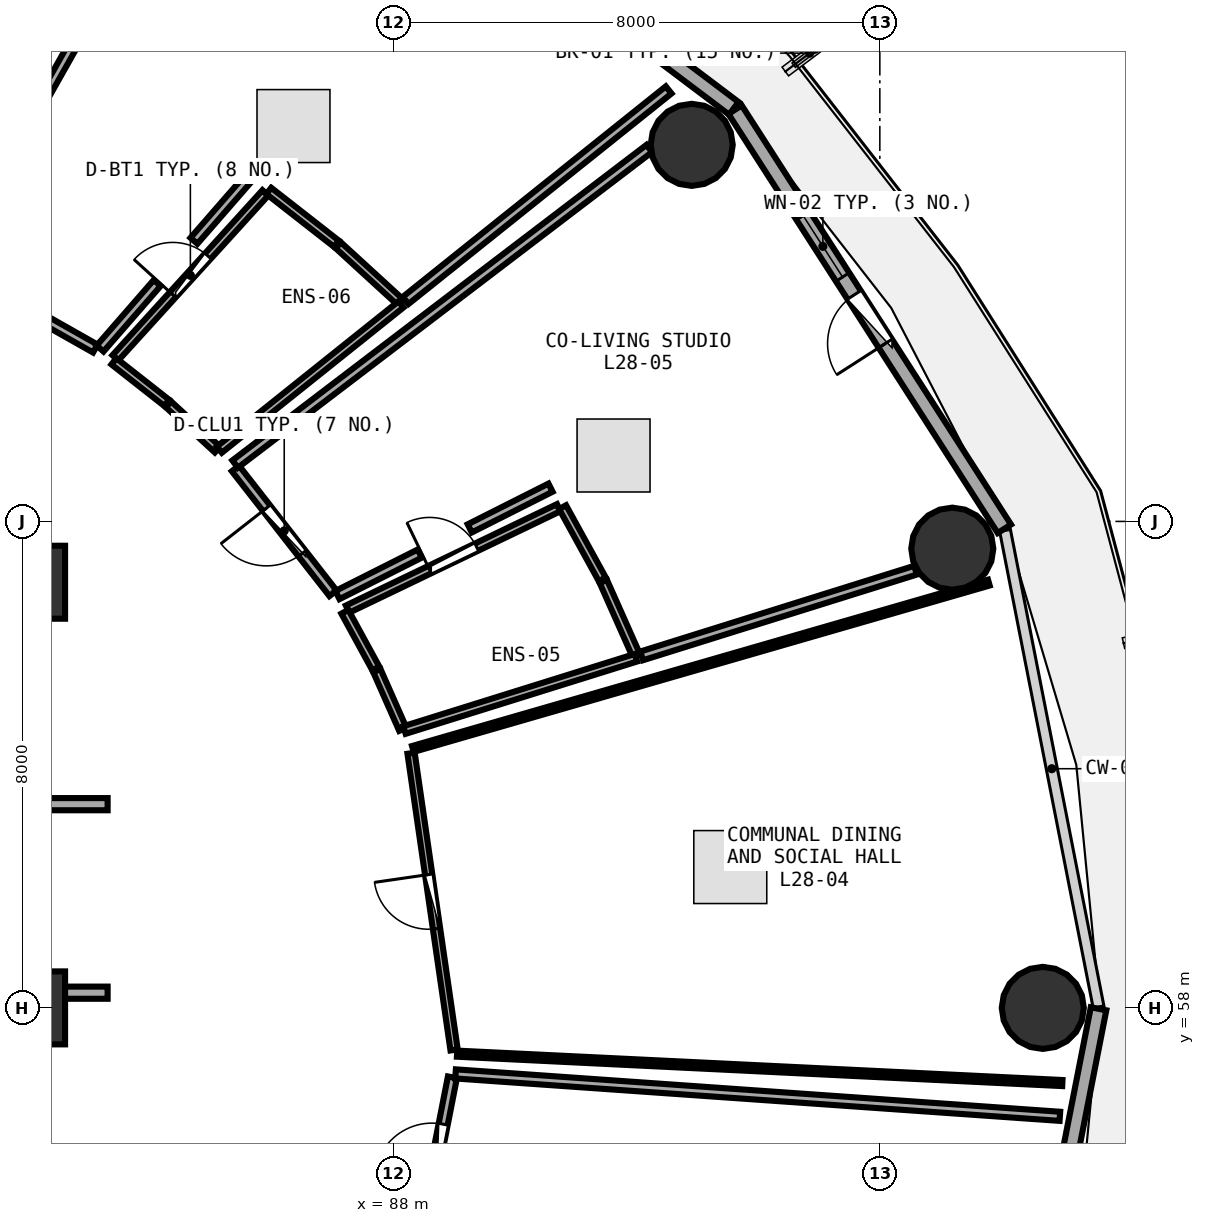
"""IFC4 building model, lengths in metres.
Left out: names, types, materials, properties, quantities, classifications, styles, units other than length and angle.
Written with IfcOpenShell. Run it as: python <this file> out.ifc"""

import sys

from ifc_helpers import new_model, si_unit, direction, frame, frame_2d, origin, origin_2d, place, context, subcontext, project, spatial, rectangle, circle, extrude, element, fill, save


model = new_model("IFC4")
c1 = context("Model", 3, precision=1e-05, world=origin(), true_north=direction((0.0, 1.0)))
c2 = subcontext(c1, "Body", "Model", "MODEL_VIEW")
j1 = project(units=[si_unit("LENGTHUNIT", "METRE"), si_unit("PLANEANGLEUNIT", "RADIAN")], contexts=[c1])
p1 = place(None, origin())
s1 = spatial("IfcSite", under=j1, at=p1, CompositionType="ELEMENT")
p2 = place(p1, origin())
s2 = spatial("IfcBuilding", under=s1, at=p2, CompositionType="ELEMENT")
p3 = place(p2, frame((0.0, 0.0, 110.1)))
s3 = spatial("IfcBuildingStorey", under=s2, at=p3, CompositionType="ELEMENT", Elevation=110.1)
for number, where, z_axis, x_axis in (
    (1, (82.0, 58.0, 0.0), (0.0, 0.0, 1.0), (1.0, 0.0, 0.0)),
    (2, (82.0, 65.0, 0.0), (0.0, 0.0, 1.0), (1.0, 0.0, 0.0)),
):
    element("IfcColumn", number, at=place(p3, frame(where, z_axis=z_axis, x_axis=x_axis)), inside=s3, PredefinedType="PILASTER", context=c2, shape_type="SweptSolid", body=[
        extrude(rectangle(XDim=1.2, YDim=1.2, at=origin_2d()), origin(), (0.0, 0.0, 1.0), 3.75),
    ])
for number, where, z_axis, x_axis in (
    (3, (98.68, 58.0, 0.0), (0.0, 0.0, 1.0), (1.0, 0.0, 0.0)),
    (4, (97.192, 65.552, 0.0), (0.0, 0.0, 1.0), (1.0, 0.0, 0.0)),
    (5, (92.906, 72.193, 0.0), (0.0, 0.0, 1.0), (1.0, 0.0, 0.0)),
):
    element("IfcColumn", number, at=place(p3, frame(where, z_axis=z_axis, x_axis=x_axis)), inside=s3, PredefinedType="COLUMN", context=c2, shape_type="SweptSolid", body=[
        extrude(circle(Radius=0.675, at=origin_2d()), origin(), (0.0, 0.0, 1.0), 3.75),
    ])
p4 = place(p3, frame((98.048, 65.879, 0.0), z_axis=(0.0, 0.0, 1.0), x_axis=(-0.540620528459, 0.841266571432, 0.0)))
e6 = element("IfcWall", 6, at=p4, inside=s3, PredefinedType="SOLIDWALL", context=c2, shape_type="SweptSolid", body=[
    extrude(rectangle(XDim=8.193, YDim=0.26, at=frame_2d((4.096, 0.0))), origin(), (0.0, 0.0, 1.0), 3.475),
])
p5 = place(p4, frame((3.621, 0.0, 0.0)))
e7 = element("IfcOpeningElement", 7, at=p5, cuts=e6, PredefinedType="OPENING", context=c2, shape_type="SweptSolid", body=[
    extrude(rectangle(XDim=0.95, YDim=2.1, at=frame_2d((0.475, 1.05))), frame((0.0, 0.14, 0.0), z_axis=(0.0, -1.0, 0.0), x_axis=(1.0, 0.0, 0.0)), (0.0, 0.0, 1.0), 0.28),
])
p6 = place(p4, frame((4.921, 0.0, 0.85)))
e8 = element("IfcOpeningElement", 8, at=p6, cuts=e6, PredefinedType="OPENING", context=c2, shape_type="SweptSolid", body=[
    extrude(rectangle(XDim=1.2, YDim=1.45, at=frame_2d((0.6, 0.725))), frame((0.0, 0.14, 0.0), z_axis=(0.0, -1.0, 0.0), x_axis=(1.0, 0.0, 0.0)), (0.0, 0.0, 1.0), 0.28),
])
p7 = place(p3, frame((93.599, 72.793, 0.0), z_axis=(0.0, 0.0, 1.0), x_axis=(-0.798501507879, 0.601992808857, 0.0)))
e9 = element("IfcWall", 9, at=p7, inside=s3, PredefinedType="SOLIDWALL", context=c2, shape_type="SweptSolid", body=[
    extrude(rectangle(XDim=8.499, YDim=0.26, at=frame_2d((4.25, 0.0))), origin(), (0.0, 0.0, 1.0), 3.475),
])
p8 = place(p7, frame((3.775, 0.0, 0.0)))
e10 = element("IfcOpeningElement", 10, at=p8, cuts=e9, PredefinedType="OPENING", context=c2, shape_type="SweptSolid", body=[
    extrude(rectangle(XDim=0.95, YDim=2.1, at=frame_2d((0.475, 1.05))), frame((0.0, 0.14, 0.0), z_axis=(0.0, -1.0, 0.0), x_axis=(1.0, 0.0, 0.0)), (0.0, 0.0, 1.0), 0.28),
])
p9 = place(p7, frame((5.075, 0.0, 0.85)))
e11 = element("IfcOpeningElement", 11, at=p9, cuts=e9, PredefinedType="OPENING", context=c2, shape_type="SweptSolid", body=[
    extrude(rectangle(XDim=1.2, YDim=1.45, at=frame_2d((0.6, 0.725))), frame((0.0, 0.14, 0.0), z_axis=(0.0, -1.0, 0.0), x_axis=(1.0, 0.0, 0.0)), (0.0, 0.0, 1.0), 0.28),
])
p10 = place(p3, frame((98.059, 50.148, 0.0), z_axis=(0.0, 0.0, 1.0), x_axis=(0.192581843632, 0.981280914674, 0.0)))
e12 = element("IfcWall", 12, at=p10, inside=s3, PredefinedType="SOLIDWALL", context=c2, shape_type="SweptSolid", body=[
    extrude(rectangle(XDim=7.987, YDim=0.26, at=frame_2d((3.993, 0.0))), origin(), (0.0, 0.0, 1.0), 3.475),
])
p11 = place(p10, frame((3.193, 0.0, 0.85)))
e13 = element("IfcOpeningElement", 13, at=p11, cuts=e12, PredefinedType="OPENING", context=c2, shape_type="SweptSolid", body=[
    extrude(rectangle(XDim=1.6, YDim=1.45, at=frame_2d((0.8, 0.725))), frame((0.0, 0.14, 0.0), z_axis=(0.0, -1.0, 0.0), x_axis=(1.0, 0.0, 0.0)), (0.0, 0.0, 1.0), 0.28),
])
p12 = place(p3, frame((79.3, 61.35, 0.0), z_axis=(0.0, 0.0, 1.0), x_axis=(1.0, 0.0, 0.0)))
e14 = element("IfcWall", 14, at=p12, inside=s3, PredefinedType="SOLIDWALL", context=c2, shape_type="SweptSolid", body=[
    extrude(rectangle(XDim=4.0, YDim=0.2, at=frame_2d((2.0, 0.0))), origin(), (0.0, 0.0, 1.0), 2.775),
])
p13 = place(p12, frame((0.45, 0.0, 0.0)))
e15 = element("IfcOpeningElement", 15, at=p13, cuts=e14, PredefinedType="OPENING", context=c2, shape_type="SweptSolid", body=[
    extrude(rectangle(XDim=1.2, YDim=2.15, at=frame_2d((0.6, 1.075))), frame((0.0, 0.11, 0.0), z_axis=(0.0, -1.0, 0.0), x_axis=(1.0, 0.0, 0.0)), (0.0, 0.0, 1.0), 0.22),
])
p14 = place(p3, frame((79.3, 58.25, 0.0), z_axis=(0.0, 0.0, 1.0), x_axis=(1.0, 0.0, 0.0)))
e16 = element("IfcWall", 16, at=p14, inside=s3, PredefinedType="SOLIDWALL", context=c2, shape_type="SweptSolid", body=[
    extrude(rectangle(XDim=4.0, YDim=0.2, at=frame_2d((2.0, 0.0))), origin(), (0.0, 0.0, 1.0), 2.775),
])
p15 = place(p14, frame((0.5, 0.0, 0.0)))
e17 = element("IfcOpeningElement", 17, at=p15, cuts=e16, PredefinedType="OPENING", context=c2, shape_type="SweptSolid", body=[
    extrude(rectangle(XDim=1.1, YDim=2.1, at=frame_2d((0.55, 1.05))), frame((0.0, 0.11, 0.0), z_axis=(0.0, -1.0, 0.0), x_axis=(1.0, 0.0, 0.0)), (0.0, 0.0, 1.0), 0.22),
])
p16 = place(p3, frame((88.485, 54.384, 0.0), z_axis=(0.0, 0.0, 1.0), x_axis=(0.192670392626, 0.981263532292, 0.0)))
e18 = element("IfcWall", 18, at=p16, inside=s3, PredefinedType="PARTITIONING", context=c2, shape_type="SweptSolid", body=[
    extrude(rectangle(XDim=2.522, YDim=0.15, at=frame_2d((1.261, 0.0))), origin(), (0.0, 0.0, 1.0), 3.48),
])
p17 = place(p16, frame((0.786, 0.0, 0.0)))
e19 = element("IfcOpeningElement", 19, at=p17, cuts=e18, PredefinedType="OPENING", context=c2, shape_type="SweptSolid", body=[
    extrude(rectangle(XDim=0.95, YDim=2.08, at=frame_2d((0.475, 1.04))), frame((0.0, 0.085, 0.0), z_axis=(0.0, -1.0, 0.0), x_axis=(1.0, 0.0, 0.0)), (0.0, 0.0, 1.0), 0.17),
])
p18 = place(p3, frame((88.998, 57.308, 0.0), z_axis=(0.0, 0.0, 1.0), x_axis=(-0.143556297193, 0.989642152263, 0.0)))
e20 = element("IfcWall", 20, at=p18, inside=s3, PredefinedType="PARTITIONING", context=c2, shape_type="SweptSolid", body=[
    extrude(rectangle(XDim=4.93, YDim=0.12, at=frame_2d((2.465, 0.0))), origin(), (0.0, 0.0, 1.0), 2.925),
])
p19 = place(p18, frame((2.015, 0.0, 0.0)))
e21 = element("IfcOpeningElement", 21, at=p19, cuts=e20, PredefinedType="OPENING", context=c2, shape_type="SweptSolid", body=[
    extrude(rectangle(XDim=0.9, YDim=2.08, at=frame_2d((0.45, 1.04))), frame((0.0, 0.07, 0.0), z_axis=(0.0, -1.0, 0.0), x_axis=(1.0, 0.0, 0.0)), (0.0, 0.0, 1.0), 0.14),
])
p20 = place(p3, frame((87.246, 64.558, 0.0), z_axis=(0.0, 0.0, 1.0), x_axis=(0.901424148611, 0.432937067368, 0.0)))
e22 = element("IfcWall", 22, at=p20, inside=s3, PredefinedType="PLUMBINGWALL", context=c2, shape_type="SweptSolid", body=[
    extrude(rectangle(XDim=3.853, YDim=0.13, at=frame_2d((1.926, 0.0))), origin(), (0.0, 0.0, 1.0), 2.925),
])
p21 = place(p20, frame((1.496, 0.0, 0.0)))
e23 = element("IfcOpeningElement", 23, at=p21, cuts=e22, PredefinedType="OPENING", context=c2, shape_type="SweptSolid", body=[
    extrude(rectangle(XDim=0.86, YDim=2.05, at=frame_2d((0.43, 1.025))), frame((0.0, 0.075, 0.0), z_axis=(0.0, -1.0, 0.0), x_axis=(1.0, 0.0, 0.0)), (0.0, 0.0, 1.0), 0.15),
])
p22 = place(p3, frame((87.007, 64.818, 0.0), z_axis=(0.0, 0.0, 1.0), x_axis=(-0.615858536596, 0.78785675278, 0.0)))
e24 = element("IfcWall", 24, at=p22, inside=s3, PredefinedType="PARTITIONING", context=c2, shape_type="SweptSolid", body=[
    extrude(rectangle(XDim=2.606, YDim=0.15, at=frame_2d((1.303, 0.0))), origin(), (0.0, 0.0, 1.0), 2.925),
])
p23 = place(p22, frame((0.828, 0.0, 0.0)))
e25 = element("IfcOpeningElement", 25, at=p23, cuts=e24, PredefinedType="OPENING", context=c2, shape_type="SweptSolid", body=[
    extrude(rectangle(XDim=0.95, YDim=2.08, at=frame_2d((0.475, 1.04))), frame((0.0, 0.085, 0.0), z_axis=(0.0, -1.0, 0.0), x_axis=(1.0, 0.0, 0.0)), (0.0, 0.0, 1.0), 0.17),
])
p24 = place(p3, frame((83.427, 68.689, 0.0), z_axis=(0.0, 0.0, 1.0), x_axis=(0.672623095828, 0.739985250501, 0.0)))
e26 = element("IfcWall", 26, at=p24, inside=s3, PredefinedType="PLUMBINGWALL", context=c2, shape_type="SweptSolid", body=[
    extrude(rectangle(XDim=3.668, YDim=0.13, at=frame_2d((1.834, 0.0))), origin(), (0.0, 0.0, 1.0), 2.925),
])
p25 = place(p24, frame((1.404, 0.0, 0.0)))
e27 = element("IfcOpeningElement", 27, at=p25, cuts=e26, PredefinedType="OPENING", context=c2, shape_type="SweptSolid", body=[
    extrude(rectangle(XDim=0.86, YDim=2.05, at=frame_2d((0.43, 1.025))), frame((0.0, 0.075, 0.0), z_axis=(0.0, -1.0, 0.0), x_axis=(1.0, 0.0, 0.0)), (0.0, 0.0, 1.0), 0.15),
])
p26 = place(p3, frame((83.098, 68.843, 0.0), z_axis=(0.0, 0.0, 1.0), x_axis=(-0.870363179511, 0.492410332702, 0.0)))
e28 = element("IfcWall", 28, at=p26, inside=s3, PredefinedType="PARTITIONING", context=c2, shape_type="SweptSolid", body=[
    extrude(rectangle(XDim=2.711, YDim=0.15, at=frame_2d((1.355, 0.0))), origin(), (0.0, 0.0, 1.0), 2.925),
])
p27 = place(p26, frame((0.881, 0.0, 0.0)))
e29 = element("IfcOpeningElement", 29, at=p27, cuts=e28, PredefinedType="OPENING", context=c2, shape_type="SweptSolid", body=[
    extrude(rectangle(XDim=0.95, YDim=2.08, at=frame_2d((0.475, 1.04))), frame((0.0, 0.085, 0.0), z_axis=(0.0, -1.0, 0.0), x_axis=(1.0, 0.0, 0.0)), (0.0, 0.0, 1.0), 0.17),
])
p28 = place(p3, frame((89.022, 56.914, 0.0), z_axis=(0.0, 0.0, 1.0), x_axis=(0.997546611002, -0.070005420344, 0.0)))
e30 = element("IfcWall", 30, at=p28, inside=s3, PredefinedType="PARTITIONING", context=c2, shape_type="SweptSolid", body=[
    extrude(rectangle(XDim=9.964, YDim=0.15, at=frame_2d((4.982, 0.0))), origin(), (0.0, 0.0, 1.0), 2.975),
])
p29 = place(p3, frame((88.32, 62.258, 0.0), z_axis=(0.0, 0.0, 1.0), x_axis=(0.960729440591, 0.277486832086, 0.0)))
e31 = element("IfcWall", 31, at=p29, inside=s3, PredefinedType="PARTITIONING", context=c2, shape_type="SweptSolid", body=[
    extrude(rectangle(XDim=9.859, YDim=0.1, at=frame_2d((4.93, 0.0))), origin(), (0.0, 0.0, 1.0), 2.975),
])
p30 = place(p3, frame((99.002, 56.764, 0.0), z_axis=(0.0, 0.0, 1.0), x_axis=(-0.998824271059, 0.048477577742, 0.0)))
e32 = element("IfcWall", 32, at=p30, inside=s3, PredefinedType="PARTITIONING", context=c2, shape_type="SweptSolid", body=[
    extrude(rectangle(XDim=9.967, YDim=0.1, at=frame_2d((4.983, 0.0))), origin(), (0.0, 0.0, 1.0), 2.975),
])
p31 = place(p3, frame((88.155, 62.581, 0.0), z_axis=(0.0, 0.0, 1.0), x_axis=(-0.404334866234, 0.91461101893, 0.0)))
e33 = element("IfcWall", 33, at=p31, inside=s3, PredefinedType="PLUMBINGWALL", context=c2, shape_type="SweptSolid", body=[
    extrude(rectangle(XDim=1.055, YDim=0.13, at=frame_2d((0.528, 0.0))), origin(), (0.0, 0.0, 1.0), 3.235),
])
p32 = place(p3, frame((87.71, 63.583, 0.0), z_axis=(0.0, 0.0, 1.0), x_axis=(-0.47920653002, 0.877702171346, 0.0)))
e34 = element("IfcWall", 34, at=p32, inside=s3, PredefinedType="PLUMBINGWALL", context=c2, shape_type="SweptSolid", body=[
    extrude(rectangle(XDim=1.062, YDim=0.13, at=frame_2d((0.531, 0.0))), origin(), (0.0, 0.0, 1.0), 3.48),
])
p33 = place(p3, frame((90.783, 66.235, 0.0), z_axis=(0.0, 0.0, 1.0), x_axis=(0.481766529195, -0.876299612774, 0.0)))
e35 = element("IfcWall", 35, at=p33, inside=s3, PredefinedType="PLUMBINGWALL", context=c2, shape_type="SweptSolid", body=[
    extrude(rectangle(XDim=1.354, YDim=0.13, at=frame_2d((0.677, 0.0))), origin(), (0.0, 0.0, 1.0), 2.925),
])
p34 = place(p3, frame((91.453, 65.012, 0.0), z_axis=(0.0, 0.0, 1.0), x_axis=(0.406407790836, -0.913691801182, 0.0)))
e36 = element("IfcWall", 36, at=p34, inside=s3, PredefinedType="PLUMBINGWALL", context=c2, shape_type="SweptSolid", body=[
    extrude(rectangle(XDim=1.346, YDim=0.13, at=frame_2d((0.673, 0.0))), origin(), (0.0, 0.0, 1.0), 3.48),
])
p35 = place(p3, frame((91.989, 63.758, 0.0), z_axis=(0.0, 0.0, 1.0), x_axis=(-0.954528980896, -0.298118138714, 0.0)))
e37 = element("IfcWall", 37, at=p35, inside=s3, PredefinedType="PLUMBINGWALL", context=c2, shape_type="SweptSolid", body=[
    extrude(rectangle(XDim=3.988, YDim=0.13, at=frame_2d((1.994, 0.0))), origin(), (0.0, 0.0, 1.0), 3.175),
])
p36 = place(p3, frame((85.397, 66.943, 0.0), z_axis=(0.0, 0.0, 1.0), x_axis=(0.795402924784, 0.606081007165, 0.0)))
e38 = element("IfcWall", 38, at=p36, inside=s3, PredefinedType="PARTITIONING", context=c2, shape_type="SweptSolid", body=[
    extrude(rectangle(XDim=8.564, YDim=0.15, at=frame_2d((4.282, 0.0))), origin(), (0.0, 0.0, 1.0), 2.925),
])
p37 = place(p3, frame((96.588, 65.198, 0.0), z_axis=(0.0, 0.0, 1.0), x_axis=(-0.954386046758, -0.298575407148, 0.0)))
e39 = element("IfcWall", 39, at=p37, inside=s3, PredefinedType="PARTITIONING", context=c2, shape_type="SweptSolid", body=[
    extrude(rectangle(XDim=4.72, YDim=0.15, at=frame_2d((2.36, 0.0))), origin(), (0.0, 0.0, 1.0), 3.235),
])
p38 = place(p3, frame((90.584, 66.555, 0.0), z_axis=(0.0, 0.0, 1.0), x_axis=(-0.893044483168, -0.449968388983, 0.0)))
e40 = element("IfcWall", 40, at=p38, inside=s3, PredefinedType="PARTITIONING", context=c2, shape_type="SweptSolid", body=[
    extrude(rectangle(XDim=1.488, YDim=0.15, at=frame_2d((0.744, 0.0))), origin(), (0.0, 0.0, 1.0), 3.175),
])
p39 = place(p3, frame((88.434, 65.471, 0.0), z_axis=(0.0, 0.0, 1.0), x_axis=(-0.893103040094, -0.44985215324, 0.0)))
e41 = element("IfcWall", 41, at=p39, inside=s3, PredefinedType="PARTITIONING", context=c2, shape_type="SweptSolid", body=[
    extrude(rectangle(XDim=1.516, YDim=0.15, at=frame_2d((0.758, 0.0))), origin(), (0.0, 0.0, 1.0), 2.925),
])
p40 = place(p3, frame((85.107, 67.182, 0.0), z_axis=(0.0, 0.0, 1.0), x_axis=(-0.735264550173, 0.677780230796, 0.0)))
e42 = element("IfcWall", 42, at=p40, inside=s3, PredefinedType="PLUMBINGWALL", context=c2, shape_type="SweptSolid", body=[
    extrude(rectangle(XDim=1.096, YDim=0.13, at=frame_2d((0.548, 0.0))), origin(), (0.0, 0.0, 1.0), 2.925),
])
p41 = place(p3, frame((84.271, 67.95, 0.0), z_axis=(0.0, 0.0, 1.0), x_axis=(-0.786487058699, 0.617606757168, 0.0)))
e43 = element("IfcWall", 43, at=p41, inside=s3, PredefinedType="PLUMBINGWALL", context=c2, shape_type="SweptSolid", body=[
    extrude(rectangle(XDim=1.104, YDim=0.13, at=frame_2d((0.552, 0.0))), origin(), (0.0, 0.0, 1.0), 2.925),
])
p42 = place(p3, frame((85.951, 71.436, 0.0), z_axis=(0.0, 0.0, 1.0), x_axis=(0.787953589467, -0.615734635087, 0.0)))
e44 = element("IfcWall", 44, at=p42, inside=s3, PredefinedType="PLUMBINGWALL", context=c2, shape_type="SweptSolid", body=[
    extrude(rectangle(XDim=1.412, YDim=0.13, at=frame_2d((0.706, 0.0))), origin(), (0.0, 0.0, 1.0), 3.175),
])
p43 = place(p3, frame((87.094, 70.541, 0.0), z_axis=(0.0, 0.0, 1.0), x_axis=(0.737639046397, -0.675195258596, 0.0)))
e45 = element("IfcWall", 45, at=p43, inside=s3, PredefinedType="PLUMBINGWALL", context=c2, shape_type="SweptSolid", body=[
    extrude(rectangle(XDim=1.4, YDim=0.13, at=frame_2d((0.7, 0.0))), origin(), (0.0, 0.0, 1.0), 3.175),
])
p44 = place(p3, frame((88.125, 69.57, 0.0), z_axis=(0.0, 0.0, 1.0), x_axis=(-0.781005766081, -0.624523813276, 0.0)))
e46 = element("IfcWall", 46, at=p44, inside=s3, PredefinedType="PLUMBINGWALL", context=c2, shape_type="SweptSolid", body=[
    extrude(rectangle(XDim=3.826, YDim=0.13, at=frame_2d((1.913, 0.0))), origin(), (0.0, 0.0, 1.0), 2.925),
])
p45 = place(p3, frame((80.706, 70.242, 0.0), z_axis=(0.0, 0.0, 1.0), x_axis=(0.491283806378, 0.870999553152, 0.0)))
e47 = element("IfcWall", 47, at=p45, inside=s3, PredefinedType="PARTITIONING", context=c2, shape_type="SweptSolid", body=[
    extrude(rectangle(XDim=9.02, YDim=0.15, at=frame_2d((4.51, 0.0))), origin(), (0.0, 0.0, 1.0), 2.925),
])
p46 = place(p3, frame((92.527, 73.096, 0.0), z_axis=(0.0, 0.0, 1.0), x_axis=(-0.780748421531, -0.624845502726, 0.0)))
e48 = element("IfcWall", 48, at=p46, inside=s3, PredefinedType="PARTITIONING", context=c2, shape_type="SweptSolid", body=[
    extrude(rectangle(XDim=5.541, YDim=0.15, at=frame_2d((2.77, 0.0))), origin(), (0.0, 0.0, 1.0), 2.975),
])
p47 = place(p3, frame((85.632, 71.662, 0.0), z_axis=(0.0, 0.0, 1.0), x_axis=(-0.656722687954, -0.7541321576, 0.0)))
e49 = element("IfcWall", 49, at=p47, inside=s3, PredefinedType="PARTITIONING", context=c2, shape_type="SweptSolid", body=[
    extrude(rectangle(XDim=1.388, YDim=0.15, at=frame_2d((0.694, 0.0))), origin(), (0.0, 0.0, 1.0), 3.175),
])
p48 = place(p3, frame((84.115, 69.921, 0.0), z_axis=(0.0, 0.0, 1.0), x_axis=(-0.656931124452, -0.75395059369, 0.0)))
e50 = element("IfcWall", 50, at=p48, inside=s3, PredefinedType="PARTITIONING", context=c2, shape_type="SweptSolid", body=[
    extrude(rectangle(XDim=1.429, YDim=0.15, at=frame_2d((0.715, 0.0))), origin(), (0.0, 0.0, 1.0), 2.925),
])
p49 = place(p3, frame((84.586, 78.336, 0.0), z_axis=(0.0, 0.0, 1.0), x_axis=(-0.468267999336, -0.883586487446, 0.0)))
e51 = element("IfcWall", 51, at=p49, inside=s3, PredefinedType="PARTITIONING", context=c2, shape_type="SweptSolid", body=[
    extrude(rectangle(XDim=8.996, YDim=0.1, at=frame_2d((4.498, 0.0))), origin(), (0.0, 0.0, 1.0), 2.925),
])
p50 = place(p5, frame((0.95, 0.0, 0.0), z_axis=(0.0, 0.0, 1.0), x_axis=(-1.0, 0.0, 0.0)))
e52 = element("IfcDoor", 52, at=p50, inside=s3, OperationType="SINGLE_SWING_RIGHT", PredefinedType="DOOR", context=c2, shape_type="SweptSolid", body=[
    extrude(rectangle(XDim=0.95, YDim=2.1, at=frame_2d((0.475, 1.05))), frame((0.0, 0.025, 0.0), z_axis=(0.0, -1.0, 0.0), x_axis=(1.0, 0.0, 0.0)), (0.0, 0.0, 1.0), 0.05),
])
fill(e7, e52)
p51 = place(p6, origin())
e53 = element("IfcWindow", 53, at=p51, inside=s3, PartitioningType="SINGLE_PANEL", PredefinedType="WINDOW", context=c2, shape_type="SweptSolid", body=[
    extrude(rectangle(XDim=1.2, YDim=1.45, at=frame_2d((0.6, 0.725))), frame((0.0, 0.03, 0.0), z_axis=(0.0, -1.0, 0.0), x_axis=(1.0, 0.0, 0.0)), (0.0, 0.0, 1.0), 0.06),
])
fill(e8, e53)
p52 = place(p17, origin())
e54 = element("IfcDoor", 54, at=p52, inside=s3, OperationType="SINGLE_SWING_LEFT", PredefinedType="DOOR", context=c2, shape_type="SweptSolid", body=[
    extrude(rectangle(XDim=0.95, YDim=2.08, at=frame_2d((0.475, 1.04))), frame((0.0, 0.025, 0.0), z_axis=(0.0, -1.0, 0.0), x_axis=(1.0, 0.0, 0.0)), (0.0, 0.0, 1.0), 0.05),
])
fill(e19, e54)
p53 = place(p19, origin())
e55 = element("IfcDoor", 55, at=p53, inside=s3, OperationType="SINGLE_SWING_RIGHT", PredefinedType="DOOR", context=c2, shape_type="SweptSolid", body=[
    extrude(rectangle(XDim=0.9, YDim=2.08, at=frame_2d((0.45, 1.04))), frame((0.0, 0.025, 0.0), z_axis=(0.0, -1.0, 0.0), x_axis=(1.0, 0.0, 0.0)), (0.0, 0.0, 1.0), 0.05),
])
fill(e21, e55)
p54 = place(p21, origin())
e56 = element("IfcDoor", 56, at=p54, inside=s3, OperationType="SINGLE_SWING_LEFT", PredefinedType="DOOR", context=c2, shape_type="SweptSolid", body=[
    extrude(rectangle(XDim=0.86, YDim=2.05, at=frame_2d((0.43, 1.025))), frame((0.0, 0.025, 0.0), z_axis=(0.0, -1.0, 0.0), x_axis=(1.0, 0.0, 0.0)), (0.0, 0.0, 1.0), 0.05),
])
fill(e23, e56)
p55 = place(p23, origin())
e57 = element("IfcDoor", 57, at=p55, inside=s3, OperationType="SINGLE_SWING_RIGHT", PredefinedType="DOOR", context=c2, shape_type="SweptSolid", body=[
    extrude(rectangle(XDim=0.95, YDim=2.08, at=frame_2d((0.475, 1.04))), frame((0.0, 0.025, 0.0), z_axis=(0.0, -1.0, 0.0), x_axis=(1.0, 0.0, 0.0)), (0.0, 0.0, 1.0), 0.05),
])
fill(e25, e57)
p56 = place(p25, origin())
e58 = element("IfcDoor", 58, at=p56, inside=s3, OperationType="SINGLE_SWING_LEFT", PredefinedType="DOOR", context=c2, shape_type="SweptSolid", body=[
    extrude(rectangle(XDim=0.86, YDim=2.05, at=frame_2d((0.43, 1.025))), frame((0.0, 0.025, 0.0), z_axis=(0.0, -1.0, 0.0), x_axis=(1.0, 0.0, 0.0)), (0.0, 0.0, 1.0), 0.05),
])
fill(e27, e58)
save(model, sys.argv[1])
